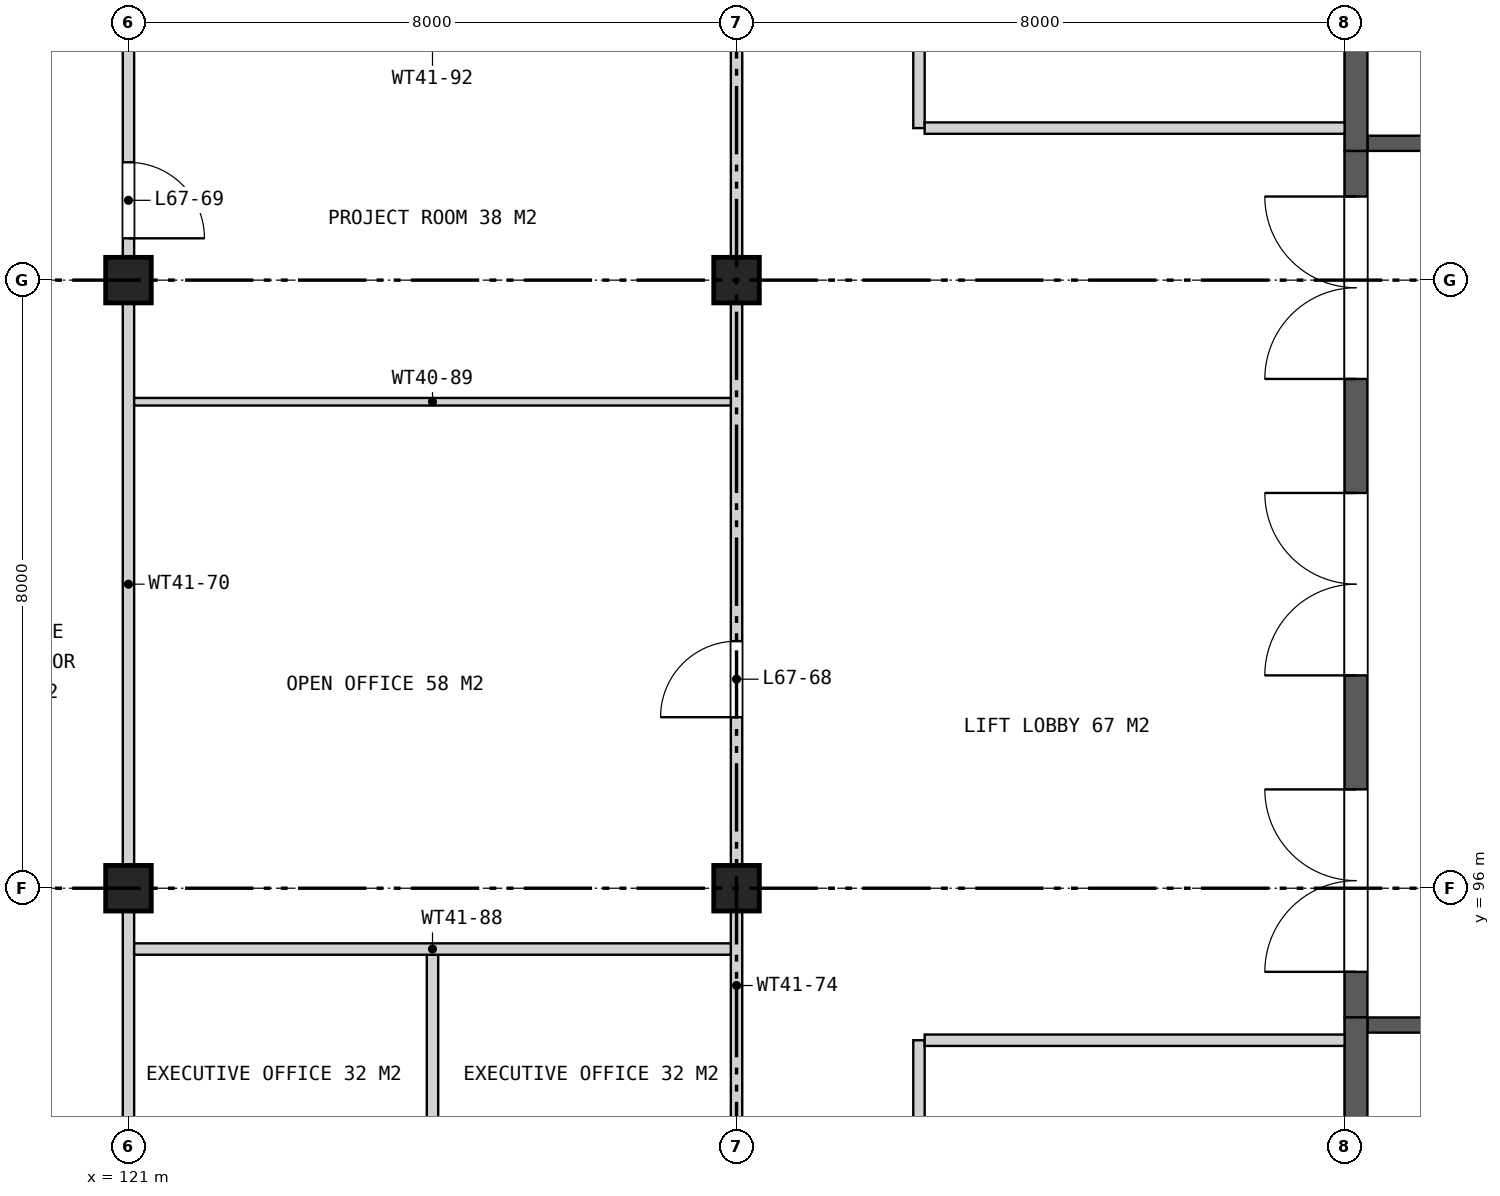
"""IFC4 building model, lengths in metres.
Left out: names, types, materials, properties, quantities, classifications, styles, units other than length and angle.
Written with IfcOpenShell. Run it as: python <this file> out.ifc"""

import sys

from ifc_helpers import new_model, si_unit, direction, frame, frame_2d, origin, origin_2d, place, context, subcontext, project, spatial, rectangle, extrude, element, fill, save


model = new_model("IFC4")
c1 = context("Model", 3, precision=1e-05, world=origin(), true_north=direction((0.0, 1.0)))
c2 = subcontext(c1, "Body", "Model", "MODEL_VIEW")
j1 = project(units=[si_unit("LENGTHUNIT", "METRE"), si_unit("PLANEANGLEUNIT", "RADIAN")], contexts=[c1])
p1 = place(None, origin())
s1 = spatial("IfcSite", under=j1, at=p1, CompositionType="ELEMENT")
p2 = place(p1, origin())
s2 = spatial("IfcBuilding", under=s1, at=p2, CompositionType="ELEMENT")
p3 = place(p2, frame((0.0, 0.0, 311.3)))
s3 = spatial("IfcBuildingStorey", under=s2, at=p3, CompositionType="ELEMENT", Elevation=311.3)
for number, where, z_axis, x_axis in (
    (1, (121.0, 96.0, 0.0), (0.0, 0.0, 1.0), (1.0, 0.0, 0.0)),
    (2, (121.0, 104.0, 0.0), (0.0, 0.0, 1.0), (1.0, 0.0, 0.0)),
    (3, (129.0, 96.0, 0.0), (0.0, 0.0, 1.0), (1.0, 0.0, 0.0)),
    (4, (129.0, 104.0, 0.0), (0.0, 0.0, 1.0), (1.0, 0.0, 0.0)),
):
    element("IfcColumn", number, at=place(p3, frame(where, z_axis=z_axis, x_axis=x_axis)), inside=s3, PredefinedType="COLUMN", context=c2, shape_type="SweptSolid", body=[
        extrude(rectangle(XDim=0.6, YDim=0.6, at=origin_2d()), origin(), (0.0, 0.0, 1.0), 4.2),
    ])
p4 = place(p3, frame((137.15, 94.3, 0.0), z_axis=(0.0, 0.0, 1.0), x_axis=(0.0, 1.0, 0.0)))
e5 = element("IfcWall", 5, at=p4, inside=s3, PredefinedType="SHEAR", context=c2, shape_type="SweptSolid", body=[
    extrude(rectangle(XDim=11.4, YDim=0.3, at=frame_2d((5.7, 0.0))), origin(), (0.0, 0.0, 1.0), 4.2),
])
p5 = place(p4, frame((0.6, 0.0, 0.0)))
e6 = element("IfcOpeningElement", 6, at=p5, cuts=e5, PredefinedType="OPENING", context=c2, shape_type="SweptSolid", body=[
    extrude(rectangle(XDim=2.4, YDim=2.4, at=frame_2d((1.2, 1.2))), frame((0.0, 0.16, 0.0), z_axis=(0.0, -1.0, 0.0), x_axis=(1.0, 0.0, 0.0)), (0.0, 0.0, 1.0), 0.32),
])
p6 = place(p4, frame((4.5, 0.0, 0.0)))
e7 = element("IfcOpeningElement", 7, at=p6, cuts=e5, PredefinedType="OPENING", context=c2, shape_type="SweptSolid", body=[
    extrude(rectangle(XDim=2.4, YDim=2.4, at=frame_2d((1.2, 1.2))), frame((0.0, 0.16, 0.0), z_axis=(0.0, -1.0, 0.0), x_axis=(1.0, 0.0, 0.0)), (0.0, 0.0, 1.0), 0.32),
])
p7 = place(p4, frame((8.4, 0.0, 0.0)))
e8 = element("IfcOpeningElement", 8, at=p7, cuts=e5, PredefinedType="OPENING", context=c2, shape_type="SweptSolid", body=[
    extrude(rectangle(XDim=2.4, YDim=2.4, at=frame_2d((1.2, 1.2))), frame((0.0, 0.16, 0.0), z_axis=(0.0, -1.0, 0.0), x_axis=(1.0, 0.0, 0.0)), (0.0, 0.0, 1.0), 0.32),
])
p8 = place(p3, frame((137.3, 105.8, 0.0), z_axis=(0.0, 0.0, 1.0), x_axis=(1.0, 0.0, 0.0)))
e9 = element("IfcWall", 9, at=p8, inside=s3, PredefinedType="SHEAR", context=c2, shape_type="SweptSolid", body=[
    extrude(rectangle(XDim=15.45, YDim=0.2, at=frame_2d((7.725, 0.0))), origin(), (0.0, 0.0, 1.0), 4.2),
])
p9 = place(p8, frame((0.95, 0.0, 0.0)))
e10 = element("IfcOpeningElement", 10, at=p9, cuts=e9, PredefinedType="OPENING", context=c2, shape_type="SweptSolid", body=[
    extrude(rectangle(XDim=1.1, YDim=2.1, at=frame_2d((0.55, 1.05))), frame((0.0, 0.11, 0.0), z_axis=(0.0, -1.0, 0.0), x_axis=(1.0, 0.0, 0.0)), (0.0, 0.0, 1.0), 0.22),
])
p10 = place(p3, frame((137.15, 105.7, 0.0), z_axis=(0.0, 0.0, 1.0), x_axis=(0.0, 1.0, 0.0)))
e11 = element("IfcWall", 11, at=p10, inside=s3, PredefinedType="SHEAR", context=c2, shape_type="SweptSolid", body=[
    extrude(rectangle(XDim=6.05, YDim=0.3, at=frame_2d((3.025, 0.0))), origin(), (0.0, 0.0, 1.0), 4.2),
])
p11 = place(p3, frame((137.3, 94.2, 0.0), z_axis=(0.0, 0.0, 1.0), x_axis=(1.0, 0.0, 0.0)))
e12 = element("IfcWall", 12, at=p11, inside=s3, PredefinedType="SHEAR", context=c2, shape_type="SweptSolid", body=[
    extrude(rectangle(XDim=15.45, YDim=0.2, at=frame_2d((7.725, 0.0))), origin(), (0.0, 0.0, 1.0), 4.2),
])
p12 = place(p11, frame((0.95, 0.0, 0.0)))
e13 = element("IfcOpeningElement", 13, at=p12, cuts=e12, PredefinedType="OPENING", context=c2, shape_type="SweptSolid", body=[
    extrude(rectangle(XDim=1.1, YDim=2.1, at=frame_2d((0.55, 1.05))), frame((0.0, 0.11, 0.0), z_axis=(0.0, -1.0, 0.0), x_axis=(1.0, 0.0, 0.0)), (0.0, 0.0, 1.0), 0.22),
])
p13 = place(p3, frame((137.15, 88.25, 0.0), z_axis=(0.0, 0.0, 1.0), x_axis=(0.0, 1.0, 0.0)))
e14 = element("IfcWall", 14, at=p13, inside=s3, PredefinedType="SHEAR", context=c2, shape_type="SweptSolid", body=[
    extrude(rectangle(XDim=6.05, YDim=0.3, at=frame_2d((3.025, 0.0))), origin(), (0.0, 0.0, 1.0), 4.2),
])
p14 = place(p3, frame((121.0, 82.4, 0.0), z_axis=(0.0, 0.0, 1.0), x_axis=(0.0, 1.0, 0.0)))
e15 = element("IfcWall", 15, at=p14, inside=s3, PredefinedType="PARTITIONING", context=c2, shape_type="SweptSolid", body=[
    extrude(rectangle(XDim=35.2, YDim=0.15, at=frame_2d((17.6, 0.0))), origin(), (0.0, 0.0, 1.0), 3.443),
])
p15 = place(p14, frame((8.25, 0.0, 0.0)))
e16 = element("IfcOpeningElement", 16, at=p15, cuts=e15, PredefinedType="OPENING", context=c2, shape_type="SweptSolid", body=[
    extrude(rectangle(XDim=1.0, YDim=2.1, at=frame_2d((0.5, 1.05))), frame((0.0, 0.085, 0.0), z_axis=(0.0, -1.0, 0.0), x_axis=(1.0, 0.0, 0.0)), (0.0, 0.0, 1.0), 0.17),
])
p16 = place(p14, frame((22.15, 0.0, 0.0)))
e17 = element("IfcOpeningElement", 17, at=p16, cuts=e15, PredefinedType="OPENING", context=c2, shape_type="SweptSolid", body=[
    extrude(rectangle(XDim=1.0, YDim=2.1, at=frame_2d((0.5, 1.05))), frame((0.0, 0.085, 0.0), z_axis=(0.0, -1.0, 0.0), x_axis=(1.0, 0.0, 0.0)), (0.0, 0.0, 1.0), 0.17),
])
p17 = place(p14, frame((26.35, 0.0, 0.0)))
e18 = element("IfcOpeningElement", 18, at=p17, cuts=e15, PredefinedType="OPENING", context=c2, shape_type="SweptSolid", body=[
    extrude(rectangle(XDim=1.0, YDim=2.1, at=frame_2d((0.5, 1.05))), frame((0.0, 0.085, 0.0), z_axis=(0.0, -1.0, 0.0), x_axis=(1.0, 0.0, 0.0)), (0.0, 0.0, 1.0), 0.17),
])
p18 = place(p3, frame((125.0, 87.275, 0.0), z_axis=(0.0, 0.0, 1.0), x_axis=(0.0, 1.0, 0.0)))
e19 = element("IfcWall", 19, at=p18, inside=s3, PredefinedType="PARTITIONING", context=c2, shape_type="SweptSolid", body=[
    extrude(rectangle(XDim=7.85, YDim=0.15, at=frame_2d((3.925, 0.0))), origin(), (0.0, 0.0, 1.0), 3.443),
])
p19 = place(p3, frame((129.0, 82.4, 0.0), z_axis=(0.0, 0.0, 1.0), x_axis=(0.0, 1.0, 0.0)))
e20 = element("IfcWall", 20, at=p19, inside=s3, PredefinedType="PARTITIONING", context=c2, shape_type="SweptSolid", body=[
    extrude(rectangle(XDim=35.2, YDim=0.15, at=frame_2d((17.6, 0.0))), origin(), (0.0, 0.0, 1.0), 3.443),
])
p20 = place(p19, frame((8.25, 0.0, 0.0)))
e21 = element("IfcOpeningElement", 21, at=p20, cuts=e20, PredefinedType="OPENING", context=c2, shape_type="SweptSolid", body=[
    extrude(rectangle(XDim=1.0, YDim=2.1, at=frame_2d((0.5, 1.05))), frame((0.0, 0.085, 0.0), z_axis=(0.0, -1.0, 0.0), x_axis=(1.0, 0.0, 0.0)), (0.0, 0.0, 1.0), 0.17),
])
p21 = place(p19, frame((15.85, 0.0, 0.0)))
e22 = element("IfcOpeningElement", 22, at=p21, cuts=e20, PredefinedType="OPENING", context=c2, shape_type="SweptSolid", body=[
    extrude(rectangle(XDim=1.0, YDim=2.1, at=frame_2d((0.5, 1.05))), frame((0.0, 0.085, 0.0), z_axis=(0.0, -1.0, 0.0), x_axis=(1.0, 0.0, 0.0)), (0.0, 0.0, 1.0), 0.17),
])
p22 = place(p19, frame((26.35, 0.0, 0.0)))
e23 = element("IfcOpeningElement", 23, at=p22, cuts=e20, PredefinedType="OPENING", context=c2, shape_type="SweptSolid", body=[
    extrude(rectangle(XDim=1.0, YDim=2.1, at=frame_2d((0.5, 1.05))), frame((0.0, 0.085, 0.0), z_axis=(0.0, -1.0, 0.0), x_axis=(1.0, 0.0, 0.0)), (0.0, 0.0, 1.0), 0.17),
])
p23 = place(p3, frame((131.4, 80.075, 0.0), z_axis=(0.0, 0.0, 1.0), x_axis=(0.0, 1.0, 0.0)))
e24 = element("IfcWall", 24, at=p23, inside=s3, PredefinedType="PARTITIONING", context=c2, shape_type="SweptSolid", body=[
    extrude(rectangle(XDim=13.925, YDim=0.15, at=frame_2d((6.962, 0.0))), origin(), (0.0, 0.0, 1.0), 3.443),
])
p24 = place(p23, frame((11.675, 0.0, 0.0)))
e25 = element("IfcOpeningElement", 25, at=p24, cuts=e24, PredefinedType="OPENING", context=c2, shape_type="SweptSolid", body=[
    extrude(rectangle(XDim=1.0, YDim=2.1, at=frame_2d((0.5, 1.05))), frame((0.0, 0.085, 0.0), z_axis=(0.0, -1.0, 0.0), x_axis=(1.0, 0.0, 0.0)), (0.0, 0.0, 1.0), 0.17),
])
p25 = place(p23, frame((8.675, 0.0, 0.0)))
e26 = element("IfcOpeningElement", 26, at=p25, cuts=e24, PredefinedType="OPENING", context=c2, shape_type="SweptSolid", body=[
    extrude(rectangle(XDim=1.0, YDim=2.1, at=frame_2d((0.5, 1.05))), frame((0.0, 0.085, 0.0), z_axis=(0.0, -1.0, 0.0), x_axis=(1.0, 0.0, 0.0)), (0.0, 0.0, 1.0), 0.17),
])
p26 = place(p23, frame((3.45, 0.0, 0.0)))
e27 = element("IfcOpeningElement", 27, at=p26, cuts=e24, PredefinedType="OPENING", context=c2, shape_type="SweptSolid", body=[
    extrude(rectangle(XDim=1.0, YDim=2.1, at=frame_2d((0.5, 1.05))), frame((0.0, 0.085, 0.0), z_axis=(0.0, -1.0, 0.0), x_axis=(1.0, 0.0, 0.0)), (0.0, 0.0, 1.0), 0.17),
])
p27 = place(p3, frame((131.4, 106.0, 0.0), z_axis=(0.0, 0.0, 1.0), x_axis=(0.0, 1.0, 0.0)))
e28 = element("IfcWall", 28, at=p27, inside=s3, PredefinedType="PARTITIONING", context=c2, shape_type="SweptSolid", body=[
    extrude(rectangle(XDim=13.925, YDim=0.15, at=frame_2d((6.962, 0.0))), origin(), (0.0, 0.0, 1.0), 3.443),
])
p28 = place(p27, frame((6.45, 0.0, 0.0)))
e29 = element("IfcOpeningElement", 29, at=p28, cuts=e28, PredefinedType="OPENING", context=c2, shape_type="SweptSolid", body=[
    extrude(rectangle(XDim=1.0, YDim=2.1, at=frame_2d((0.5, 1.05))), frame((0.0, 0.085, 0.0), z_axis=(0.0, -1.0, 0.0), x_axis=(1.0, 0.0, 0.0)), (0.0, 0.0, 1.0), 0.17),
])
p29 = place(p3, frame((131.475, 94.0, 0.0), z_axis=(0.0, 0.0, 1.0), x_axis=(1.0, 0.0, 0.0)))
e30 = element("IfcWall", 30, at=p29, inside=s3, PredefinedType="PARTITIONING", context=c2, shape_type="SweptSolid", body=[
    extrude(rectangle(XDim=5.525, YDim=0.15, at=frame_2d((2.762, 0.0))), origin(), (0.0, 0.0, 1.0), 3.443),
])
p30 = place(p3, frame((121.075, 95.2, 0.0), z_axis=(0.0, 0.0, 1.0), x_axis=(1.0, 0.0, 0.0)))
e31 = element("IfcWall", 31, at=p30, inside=s3, PredefinedType="PARTITIONING", context=c2, shape_type="SweptSolid", body=[
    extrude(rectangle(XDim=7.85, YDim=0.15, at=frame_2d((3.925, 0.0))), origin(), (0.0, 0.0, 1.0), 3.443),
])
p31 = place(p3, frame((121.075, 102.4, 0.0), z_axis=(0.0, 0.0, 1.0), x_axis=(1.0, 0.0, 0.0)))
e32 = element("IfcWall", 32, at=p31, inside=s3, PredefinedType="PARTITIONING", context=c2, shape_type="SweptSolid", body=[
    extrude(rectangle(XDim=7.85, YDim=0.1, at=frame_2d((3.925, 0.0))), origin(), (0.0, 0.0, 1.0), 3.443),
])
p32 = place(p3, frame((131.475, 106.0, 0.0), z_axis=(0.0, 0.0, 1.0), x_axis=(1.0, 0.0, 0.0)))
e33 = element("IfcWall", 33, at=p32, inside=s3, PredefinedType="PARTITIONING", context=c2, shape_type="SweptSolid", body=[
    extrude(rectangle(XDim=5.525, YDim=0.15, at=frame_2d((2.762, 0.0))), origin(), (0.0, 0.0, 1.0), 3.443),
])
p33 = place(p5, origin())
e34 = element("IfcDoor", 34, at=p33, inside=s3, OperationType="DOUBLE_DOOR_SINGLE_SWING", PredefinedType="DOOR", context=c2, shape_type="SweptSolid", body=[
    extrude(rectangle(XDim=2.4, YDim=2.4, at=frame_2d((1.2, 1.2))), frame((0.0, 0.025, 0.0), z_axis=(0.0, -1.0, 0.0), x_axis=(1.0, 0.0, 0.0)), (0.0, 0.0, 1.0), 0.05),
])
fill(e6, e34)
p34 = place(p6, origin())
e35 = element("IfcDoor", 35, at=p34, inside=s3, OperationType="DOUBLE_DOOR_SINGLE_SWING", PredefinedType="DOOR", context=c2, shape_type="SweptSolid", body=[
    extrude(rectangle(XDim=2.4, YDim=2.4, at=frame_2d((1.2, 1.2))), frame((0.0, 0.025, 0.0), z_axis=(0.0, -1.0, 0.0), x_axis=(1.0, 0.0, 0.0)), (0.0, 0.0, 1.0), 0.05),
])
fill(e7, e35)
p35 = place(p7, origin())
e36 = element("IfcDoor", 36, at=p35, inside=s3, OperationType="DOUBLE_DOOR_SINGLE_SWING", PredefinedType="DOOR", context=c2, shape_type="SweptSolid", body=[
    extrude(rectangle(XDim=2.4, YDim=2.4, at=frame_2d((1.2, 1.2))), frame((0.0, 0.025, 0.0), z_axis=(0.0, -1.0, 0.0), x_axis=(1.0, 0.0, 0.0)), (0.0, 0.0, 1.0), 0.05),
])
fill(e8, e36)
p36 = place(p21, origin())
e37 = element("IfcDoor", 37, at=p36, inside=s3, OperationType="SINGLE_SWING_LEFT", PredefinedType="DOOR", context=c2, shape_type="SweptSolid", body=[
    extrude(rectangle(XDim=1.0, YDim=2.1, at=frame_2d((0.5, 1.05))), frame((0.0, 0.025, 0.0), z_axis=(0.0, -1.0, 0.0), x_axis=(1.0, 0.0, 0.0)), (0.0, 0.0, 1.0), 0.05),
])
fill(e22, e37)
p37 = place(p16, frame((1.0, 0.0, 0.0), z_axis=(0.0, 0.0, 1.0), x_axis=(-1.0, 0.0, 0.0)))
e38 = element("IfcDoor", 38, at=p37, inside=s3, OperationType="SINGLE_SWING_RIGHT", PredefinedType="DOOR", context=c2, shape_type="SweptSolid", body=[
    extrude(rectangle(XDim=1.0, YDim=2.1, at=frame_2d((0.5, 1.05))), frame((0.0, 0.025, 0.0), z_axis=(0.0, -1.0, 0.0), x_axis=(1.0, 0.0, 0.0)), (0.0, 0.0, 1.0), 0.05),
])
fill(e17, e38)
save(model, sys.argv[1])
